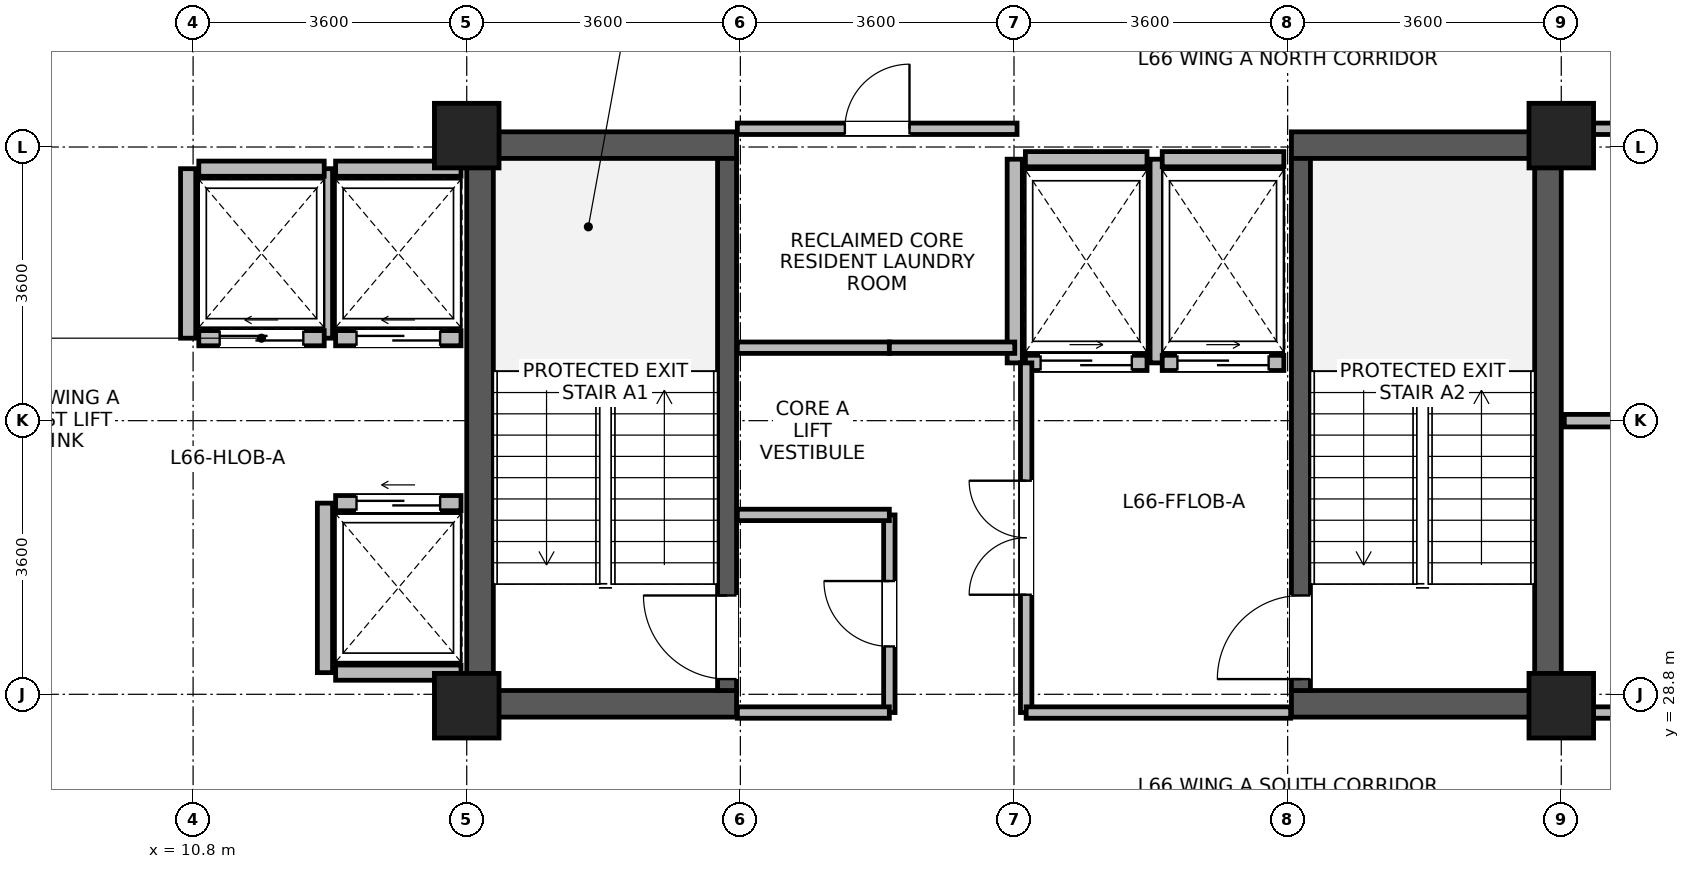
"""IFC4 building model, lengths in metres.
Left out: names, types, materials, properties, quantities, classifications, styles, units other than length and angle.
Written with IfcOpenShell. Run it as: python <this file> out.ifc"""

import sys

from ifc_helpers import new_model, si_unit, direction, frame, frame_2d, origin, origin_2d, place, context, subcontext, project, spatial, rectangle, extrude, source, transform, mapped, element, fill, save


model = new_model("IFC4")
c1 = context("Model", 3, precision=1e-05, world=origin(), true_north=direction((0.0, 1.0)))
c2 = subcontext(c1, "Body", "Model", "MODEL_VIEW")
j1 = project(units=[si_unit("LENGTHUNIT", "METRE"), si_unit("PLANEANGLEUNIT", "RADIAN")], contexts=[c1])
p1 = place(None, origin())
s1 = spatial("IfcSite", under=j1, at=p1, CompositionType="ELEMENT")
p2 = place(p1, origin())
s2 = spatial("IfcBuilding", under=s1, at=p2, CompositionType="ELEMENT")
p3 = place(p2, frame((0.0, 0.0, 257.3)))
s3 = spatial("IfcBuildingStorey", under=s2, at=p3, CompositionType="ELEMENT", Elevation=257.3)
for number, where, z_axis, x_axis in (
    (1, (14.575, 28.5, 0.0), (0.0, 0.0, 1.0), (0.0, 1.0, 0.0)),
    (2, (28.625, 28.5, 0.0), (0.0, 0.0, 1.0), (0.0, 1.0, 0.0)),
):
    element("IfcWall", number, at=place(p3, frame(where, z_axis=z_axis, x_axis=x_axis)), inside=s3, PredefinedType="SHEAR", context=c2, shape_type="SweptSolid", body=[
        extrude(rectangle(XDim=7.7, YDim=0.35, at=frame_2d((3.85, 0.0))), origin(), (0.0, 0.0, 1.0), 3.475),
    ])
for number, where, z_axis, x_axis in (
    (3, (14.75, 28.675, 0.0), (0.0, 0.0, 1.0), (1.0, 0.0, 0.0)),
    (4, (25.25, 28.675, 0.0), (0.0, 0.0, 1.0), (1.0, 0.0, 0.0)),
    (5, (14.75, 36.025, 0.0), (0.0, 0.0, 1.0), (1.0, 0.0, 0.0)),
    (6, (25.25, 36.025, 0.0), (0.0, 0.0, 1.0), (1.0, 0.0, 0.0)),
):
    element("IfcWall", number, at=place(p3, frame(where, z_axis=z_axis, x_axis=x_axis)), inside=s3, PredefinedType="SHEAR", context=c2, shape_type="SweptSolid", body=[
        extrude(rectangle(XDim=3.2, YDim=0.35, at=frame_2d((1.6, 0.0))), origin(), (0.0, 0.0, 1.0), 3.475),
    ])
p4 = place(p3, frame((17.825, 28.85, 0.0), z_axis=(0.0, 0.0, 1.0), x_axis=(0.0, 1.0, 0.0)))
e7 = element("IfcWall", 7, at=p4, inside=s3, PredefinedType="SHEAR", context=c2, shape_type="SweptSolid", body=[
    extrude(rectangle(XDim=7.0, YDim=0.25, at=frame_2d((3.5, 0.0))), origin(), (0.0, 0.0, 1.0), 3.475),
])
p5 = place(p4, frame((0.15, 0.0, 0.0)))
e8 = element("IfcOpeningElement", 8, at=p5, cuts=e7, PredefinedType="OPENING", context=c2, shape_type="SweptSolid", body=[
    extrude(rectangle(XDim=1.1, YDim=2.08, at=frame_2d((0.55, 1.04))), frame((0.0, 0.135, 0.0), z_axis=(0.0, -1.0, 0.0), x_axis=(1.0, 0.0, 0.0)), (0.0, 0.0, 1.0), 0.27),
])
p6 = place(p3, frame((25.375, 28.85, 0.0), z_axis=(0.0, 0.0, 1.0), x_axis=(0.0, 1.0, 0.0)))
e9 = element("IfcWall", 9, at=p6, inside=s3, PredefinedType="SHEAR", context=c2, shape_type="SweptSolid", body=[
    extrude(rectangle(XDim=7.0, YDim=0.25, at=frame_2d((3.5, 0.0))), origin(), (0.0, 0.0, 1.0), 3.475),
])
p7 = place(p6, frame((0.15, 0.0, 0.0)))
e10 = element("IfcOpeningElement", 10, at=p7, cuts=e9, PredefinedType="OPENING", context=c2, shape_type="SweptSolid", body=[
    extrude(rectangle(XDim=1.1, YDim=2.08, at=frame_2d((0.55, 1.04))), frame((0.0, 0.135, 0.0), z_axis=(0.0, -1.0, 0.0), x_axis=(1.0, 0.0, 0.0)), (0.0, 0.0, 1.0), 0.27),
])
m1 = source(origin(), c2, "Body", "SweptSolid", [
    extrude(rectangle(XDim=0.85, YDim=0.85, at=origin_2d()), origin(), (0.0, 0.0, 1.0), 3.7),
])
for number, where, z_axis, x_axis in (
    (11, (14.4, 28.65, 0.0), (0.0, 0.0, 1.0), (1.0, 0.0, 0.0)),
    (12, (14.4, 36.15, 0.0), (0.0, 0.0, 1.0), (1.0, 0.0, 0.0)),
    (13, (28.8, 28.65, 0.0), (0.0, 0.0, 1.0), (1.0, 0.0, 0.0)),
    (14, (28.8, 36.15, 0.0), (0.0, 0.0, 1.0), (1.0, 0.0, 0.0)),
):
    element("IfcColumn", number, at=place(p3, frame(where, z_axis=z_axis, x_axis=x_axis)), inside=s3, PredefinedType="COLUMN", context=c2, shape_type="MappedRepresentation", body=[
        mapped(m1, transform((0.0, 0.0, 0.0), x_axis=(1.0, 0.0, 0.0), y_axis=(0.0, 1.0, 0.0), z_axis=(0.0, 0.0, 1.0), scale=1.0)),
    ])
p8 = place(p3, frame((12.675, 33.485, 0.0), z_axis=(0.0, 0.0, 1.0), x_axis=(1.0, 0.0, 0.0)))
e15 = element("IfcWall", 15, at=p8, inside=s3, PredefinedType="PARTITIONING", context=c2, shape_type="SweptSolid", body=[
    extrude(rectangle(XDim=1.65, YDim=0.2, at=frame_2d((0.825, 0.0))), origin(), (0.0, 0.0, 1.0), 3.455),
])
p9 = place(p8, frame((0.275, 0.0, 0.0)))
e16 = element("IfcOpeningElement", 16, at=p9, cuts=e15, PredefinedType="OPENING", context=c2, shape_type="SweptSolid", body=[
    extrude(rectangle(XDim=1.1, YDim=2.12, at=frame_2d((0.55, 1.06))), frame((0.0, 0.11, 0.0), z_axis=(0.0, -1.0, 0.0), x_axis=(1.0, 0.0, 0.0)), (0.0, 0.0, 1.0), 0.22),
])
p10 = place(p3, frame((12.675, 35.715, 0.0), z_axis=(0.0, 0.0, 1.0), x_axis=(1.0, 0.0, 0.0)))
e17 = element("IfcWall", 17, at=p10, inside=s3, PredefinedType="PARTITIONING", context=c2, shape_type="SweptSolid", body=[
    extrude(rectangle(XDim=1.65, YDim=0.2, at=frame_2d((0.825, 0.0))), origin(), (0.0, 0.0, 1.0), 3.455),
])
p11 = place(p3, frame((12.535, 33.485, 0.0), z_axis=(0.0, 0.0, 1.0), x_axis=(0.0, 1.0, 0.0)))
e18 = element("IfcWall", 18, at=p11, inside=s3, PredefinedType="PARTITIONING", context=c2, shape_type="SweptSolid", body=[
    extrude(rectangle(XDim=2.23, YDim=0.2, at=frame_2d((1.115, 0.0))), origin(), (0.0, 0.0, 1.0), 3.455),
])
p12 = place(p3, frame((12.675, 29.085, 0.0), z_axis=(0.0, 0.0, 1.0), x_axis=(1.0, 0.0, 0.0)))
e19 = element("IfcWall", 19, at=p12, inside=s3, PredefinedType="PARTITIONING", context=c2, shape_type="SweptSolid", body=[
    extrude(rectangle(XDim=1.65, YDim=0.2, at=frame_2d((0.825, 0.0))), origin(), (0.0, 0.0, 1.0), 3.455),
])
p13 = place(p3, frame((12.675, 31.315, 0.0), z_axis=(0.0, 0.0, 1.0), x_axis=(1.0, 0.0, 0.0)))
e20 = element("IfcWall", 20, at=p13, inside=s3, PredefinedType="PARTITIONING", context=c2, shape_type="SweptSolid", body=[
    extrude(rectangle(XDim=1.65, YDim=0.2, at=frame_2d((0.825, 0.0))), origin(), (0.0, 0.0, 1.0), 3.455),
])
p14 = place(p13, frame((0.275, 0.0, 0.0)))
e21 = element("IfcOpeningElement", 21, at=p14, cuts=e20, PredefinedType="OPENING", context=c2, shape_type="SweptSolid", body=[
    extrude(rectangle(XDim=1.1, YDim=2.12, at=frame_2d((0.55, 1.06))), frame((0.0, 0.11, 0.0), z_axis=(0.0, -1.0, 0.0), x_axis=(1.0, 0.0, 0.0)), (0.0, 0.0, 1.0), 0.22),
])
p15 = place(p3, frame((12.535, 29.085, 0.0), z_axis=(0.0, 0.0, 1.0), x_axis=(0.0, 1.0, 0.0)))
e22 = element("IfcWall", 22, at=p15, inside=s3, PredefinedType="PARTITIONING", context=c2, shape_type="SweptSolid", body=[
    extrude(rectangle(XDim=2.23, YDim=0.2, at=frame_2d((1.115, 0.0))), origin(), (0.0, 0.0, 1.0), 3.455),
])
p16 = place(p3, frame((10.875, 33.485, 0.0), z_axis=(0.0, 0.0, 1.0), x_axis=(1.0, 0.0, 0.0)))
e23 = element("IfcWall", 23, at=p16, inside=s3, PredefinedType="PARTITIONING", context=c2, shape_type="SweptSolid", body=[
    extrude(rectangle(XDim=1.65, YDim=0.2, at=frame_2d((0.825, 0.0))), origin(), (0.0, 0.0, 1.0), 3.455),
])
p17 = place(p16, frame((0.275, 0.0, 0.0)))
e24 = element("IfcOpeningElement", 24, at=p17, cuts=e23, PredefinedType="OPENING", context=c2, shape_type="SweptSolid", body=[
    extrude(rectangle(XDim=1.1, YDim=2.12, at=frame_2d((0.55, 1.06))), frame((0.0, 0.11, 0.0), z_axis=(0.0, -1.0, 0.0), x_axis=(1.0, 0.0, 0.0)), (0.0, 0.0, 1.0), 0.22),
])
p18 = place(p3, frame((10.875, 35.715, 0.0), z_axis=(0.0, 0.0, 1.0), x_axis=(1.0, 0.0, 0.0)))
e25 = element("IfcWall", 25, at=p18, inside=s3, PredefinedType="PARTITIONING", context=c2, shape_type="SweptSolid", body=[
    extrude(rectangle(XDim=1.65, YDim=0.2, at=frame_2d((0.825, 0.0))), origin(), (0.0, 0.0, 1.0), 3.455),
])
p19 = place(p3, frame((10.735, 33.485, 0.0), z_axis=(0.0, 0.0, 1.0), x_axis=(0.0, 1.0, 0.0)))
e26 = element("IfcWall", 26, at=p19, inside=s3, PredefinedType="PARTITIONING", context=c2, shape_type="SweptSolid", body=[
    extrude(rectangle(XDim=2.23, YDim=0.2, at=frame_2d((1.115, 0.0))), origin(), (0.0, 0.0, 1.0), 3.455),
])
p20 = place(p3, frame((21.75, 33.16, 0.0), z_axis=(0.0, 0.0, 1.0), x_axis=(1.0, 0.0, 0.0)))
e27 = element("IfcWall", 27, at=p20, inside=s3, PredefinedType="PARTITIONING", context=c2, shape_type="SweptSolid", body=[
    extrude(rectangle(XDim=1.6, YDim=0.2, at=frame_2d((0.8, 0.0))), origin(), (0.0, 0.0, 1.0), 3.455),
])
p21 = place(p20, frame((0.2, 0.0, 0.0)))
e28 = element("IfcOpeningElement", 28, at=p21, cuts=e27, PredefinedType="OPENING", context=c2, shape_type="SweptSolid", body=[
    extrude(rectangle(XDim=1.2, YDim=2.12, at=frame_2d((0.6, 1.06))), frame((0.0, 0.11, 0.0), z_axis=(0.0, -1.0, 0.0), x_axis=(1.0, 0.0, 0.0)), (0.0, 0.0, 1.0), 0.22),
])
p22 = place(p3, frame((21.75, 35.84, 0.0), z_axis=(0.0, 0.0, 1.0), x_axis=(1.0, 0.0, 0.0)))
e29 = element("IfcWall", 29, at=p22, inside=s3, PredefinedType="PARTITIONING", context=c2, shape_type="SweptSolid", body=[
    extrude(rectangle(XDim=1.6, YDim=0.2, at=frame_2d((0.8, 0.0))), origin(), (0.0, 0.0, 1.0), 2.555),
])
for number, where, z_axis, x_axis in (
    (30, (21.61, 33.16, 0.0), (0.0, 0.0, 1.0), (0.0, 1.0, 0.0)),
    (31, (23.49, 33.16, 0.0), (0.0, 0.0, 1.0), (0.0, 1.0, 0.0)),
):
    element("IfcWall", number, at=place(p3, frame(where, z_axis=z_axis, x_axis=x_axis)), inside=s3, PredefinedType="PARTITIONING", context=c2, shape_type="SweptSolid", body=[
        extrude(rectangle(XDim=2.68, YDim=0.2, at=frame_2d((1.34, 0.0))), origin(), (0.0, 0.0, 1.0), 3.455),
    ])
p23 = place(p3, frame((23.55, 33.16, 0.0), z_axis=(0.0, 0.0, 1.0), x_axis=(1.0, 0.0, 0.0)))
e32 = element("IfcWall", 32, at=p23, inside=s3, PredefinedType="PARTITIONING", context=c2, shape_type="SweptSolid", body=[
    extrude(rectangle(XDim=1.6, YDim=0.2, at=frame_2d((0.8, 0.0))), origin(), (0.0, 0.0, 1.0), 3.455),
])
p24 = place(p23, frame((0.2, 0.0, 0.0)))
e33 = element("IfcOpeningElement", 33, at=p24, cuts=e32, PredefinedType="OPENING", context=c2, shape_type="SweptSolid", body=[
    extrude(rectangle(XDim=1.2, YDim=2.12, at=frame_2d((0.6, 1.06))), frame((0.0, 0.11, 0.0), z_axis=(0.0, -1.0, 0.0), x_axis=(1.0, 0.0, 0.0)), (0.0, 0.0, 1.0), 0.22),
])
p25 = place(p3, frame((23.55, 35.84, 0.0), z_axis=(0.0, 0.0, 1.0), x_axis=(1.0, 0.0, 0.0)))
e34 = element("IfcWall", 34, at=p25, inside=s3, PredefinedType="PARTITIONING", context=c2, shape_type="SweptSolid", body=[
    extrude(rectangle(XDim=1.6, YDim=0.2, at=frame_2d((0.8, 0.0))), origin(), (0.0, 0.0, 1.0), 2.555),
])
p26 = place(p3, frame((29.225, 28.56, 0.0), z_axis=(0.0, 0.0, 1.0), x_axis=(1.0, 0.0, 0.0)))
e35 = element("IfcWall", 35, at=p26, inside=s3, PredefinedType="PARTITIONING", context=c2, shape_type="SweptSolid", body=[
    extrude(rectangle(XDim=4.135, YDim=0.15, at=frame_2d((2.067, 0.0))), origin(), (0.0, 0.0, 1.0), 2.905),
])
p27 = place(p26, frame((1.637, 0.0, 0.0)))
e36 = element("IfcOpeningElement", 36, at=p27, cuts=e35, PredefinedType="OPENING", context=c2, shape_type="SweptSolid", body=[
    extrude(rectangle(XDim=0.86, YDim=2.02, at=frame_2d((0.43, 1.01))), frame((0.0, 0.085, 0.0), z_axis=(0.0, -1.0, 0.0), x_axis=(1.0, 0.0, 0.0)), (0.0, 0.0, 1.0), 0.17),
])
p28 = place(p3, frame((29.225, 36.24, 0.0), z_axis=(0.0, 0.0, 1.0), x_axis=(1.0, 0.0, 0.0)))
e37 = element("IfcWall", 37, at=p28, inside=s3, PredefinedType="PARTITIONING", context=c2, shape_type="SweptSolid", body=[
    extrude(rectangle(XDim=4.135, YDim=0.15, at=frame_2d((2.067, 0.0))), origin(), (0.0, 0.0, 1.0), 2.905),
])
p29 = place(p28, frame((1.417, 0.0, 0.0)))
e38 = element("IfcOpeningElement", 38, at=p29, cuts=e37, PredefinedType="OPENING", context=c2, shape_type="SweptSolid", body=[
    extrude(rectangle(XDim=1.3, YDim=2.12, at=frame_2d((0.65, 1.06))), frame((0.0, 0.085, 0.0), z_axis=(0.0, -1.0, 0.0), x_axis=(1.0, 0.0, 0.0)), (0.0, 0.0, 1.0), 0.17),
])
p30 = place(p3, frame((17.96, 36.24, 0.0), z_axis=(0.0, 0.0, 1.0), x_axis=(1.0, 0.0, 0.0)))
e39 = element("IfcWall", 39, at=p30, inside=s3, PredefinedType="PARTITIONING", context=c2, shape_type="SweptSolid", body=[
    extrude(rectangle(XDim=3.68, YDim=0.15, at=frame_2d((1.84, 0.0))), origin(), (0.0, 0.0, 1.0), 2.555),
])
p31 = place(p30, frame((1.415, 0.0, 0.0)))
e40 = element("IfcOpeningElement", 40, at=p31, cuts=e39, PredefinedType="OPENING", context=c2, shape_type="SweptSolid", body=[
    extrude(rectangle(XDim=0.85, YDim=2.04, at=frame_2d((0.425, 1.02))), frame((0.0, 0.085, 0.0), z_axis=(0.0, -1.0, 0.0), x_axis=(1.0, 0.0, 0.0)), (0.0, 0.0, 1.0), 0.17),
])
p32 = place(p3, frame((19.96, 28.56, 0.0), z_axis=(0.0, 0.0, 1.0), x_axis=(0.0, 1.0, 0.0)))
e41 = element("IfcWall", 41, at=p32, inside=s3, PredefinedType="PARTITIONING", context=c2, shape_type="SweptSolid", body=[
    extrude(rectangle(XDim=2.6, YDim=0.15, at=frame_2d((1.3, 0.0))), origin(), (0.0, 0.0, 1.0), 3.455),
])
p33 = place(p32, frame((0.87, 0.0, 0.0)))
e42 = element("IfcOpeningElement", 42, at=p33, cuts=e41, PredefinedType="OPENING", context=c2, shape_type="SweptSolid", body=[
    extrude(rectangle(XDim=0.86, YDim=2.02, at=frame_2d((0.43, 1.01))), frame((0.0, 0.085, 0.0), z_axis=(0.0, -1.0, 0.0), x_axis=(1.0, 0.0, 0.0)), (0.0, 0.0, 1.0), 0.17),
])
p34 = place(p3, frame((17.96, 28.56, 0.0), z_axis=(0.0, 0.0, 1.0), x_axis=(1.0, 0.0, 0.0)))
e43 = element("IfcWall", 43, at=p34, inside=s3, PredefinedType="PARTITIONING", context=c2, shape_type="SweptSolid", body=[
    extrude(rectangle(XDim=2.0, YDim=0.15, at=frame_2d((1.0, 0.0))), origin(), (0.0, 0.0, 1.0), 2.555),
])
for number, where, z_axis, x_axis in (
    (44, (17.96, 31.16, 0.0), (0.0, 0.0, 1.0), (1.0, 0.0, 0.0)),
    (45, (17.96, 33.36, 0.0), (0.0, 0.0, 1.0), (1.0, 0.0, 0.0)),
):
    element("IfcWall", number, at=place(p3, frame(where, z_axis=z_axis, x_axis=x_axis)), inside=s3, PredefinedType="PARTITIONING", context=c2, shape_type="SweptSolid", body=[
        extrude(rectangle(XDim=2.0, YDim=0.15, at=frame_2d((1.0, 0.0))), origin(), (0.0, 0.0, 1.0), 3.455),
    ])
p35 = place(p3, frame((19.96, 33.36, 0.0), z_axis=(0.0, 0.0, 1.0), x_axis=(1.0, 0.0, 0.0)))
e46 = element("IfcWall", 46, at=p35, inside=s3, PredefinedType="PARTITIONING", context=c2, shape_type="SweptSolid", body=[
    extrude(rectangle(XDim=1.65, YDim=0.15, at=frame_2d((0.825, 0.0))), origin(), (0.0, 0.0, 1.0), 3.455),
])
p36 = place(p3, frame((21.76, 28.56, 0.0), z_axis=(0.0, 0.0, 1.0), x_axis=(0.0, 1.0, 0.0)))
e47 = element("IfcWall", 47, at=p36, inside=s3, PredefinedType="PARTITIONING", context=c2, shape_type="SweptSolid", body=[
    extrude(rectangle(XDim=4.6, YDim=0.15, at=frame_2d((2.3, 0.0))), origin(), (0.0, 0.0, 1.0), 3.455),
])
p37 = place(p36, frame((1.55, 0.0, 0.0)))
e48 = element("IfcOpeningElement", 48, at=p37, cuts=e47, PredefinedType="OPENING", context=c2, shape_type="SweptSolid", body=[
    extrude(rectangle(XDim=1.5, YDim=2.1, at=frame_2d((0.75, 1.05))), frame((0.0, 0.085, 0.0), z_axis=(0.0, -1.0, 0.0), x_axis=(1.0, 0.0, 0.0)), (0.0, 0.0, 1.0), 0.17),
])
p38 = place(p3, frame((28.84, 32.4, 0.0), z_axis=(0.0, 0.0, 1.0), x_axis=(1.0, 0.0, 0.0)))
e49 = element("IfcWall", 49, at=p38, inside=s3, PredefinedType="PARTITIONING", context=c2, shape_type="SweptSolid", body=[
    extrude(rectangle(XDim=4.52, YDim=0.165, at=frame_2d((2.26, 0.0))), origin(), (0.0, 0.0, 1.0), 3.455),
])
p39 = place(p3, frame((21.76, 28.56, 0.0), z_axis=(0.0, 0.0, 1.0), x_axis=(1.0, 0.0, 0.0)))
e50 = element("IfcWall", 50, at=p39, inside=s3, PredefinedType="PARTITIONING", context=c2, shape_type="SweptSolid", body=[
    extrude(rectangle(XDim=3.48, YDim=0.15, at=frame_2d((1.74, 0.0))), origin(), (0.0, 0.0, 1.0), 2.555),
])
p40 = place(p5, origin())
e51 = element("IfcDoor", 51, at=p40, inside=s3, OperationType="SINGLE_SWING_RIGHT", PredefinedType="DOOR", context=c2, shape_type="SweptSolid", body=[
    extrude(rectangle(XDim=1.1, YDim=2.08, at=frame_2d((0.55, 1.04))), frame((0.0, 0.025, 0.0), z_axis=(0.0, -1.0, 0.0), x_axis=(1.0, 0.0, 0.0)), (0.0, 0.0, 1.0), 0.05),
])
fill(e8, e51)
p41 = place(p7, origin())
e52 = element("IfcDoor", 52, at=p41, inside=s3, OperationType="SINGLE_SWING_LEFT", PredefinedType="DOOR", context=c2, shape_type="SweptSolid", body=[
    extrude(rectangle(XDim=1.1, YDim=2.08, at=frame_2d((0.55, 1.04))), frame((0.0, 0.025, 0.0), z_axis=(0.0, -1.0, 0.0), x_axis=(1.0, 0.0, 0.0)), (0.0, 0.0, 1.0), 0.05),
])
fill(e10, e52)
p42 = place(p9, origin())
e53 = element("IfcDoor", 53, at=p42, inside=s3, OperationType="SLIDING_TO_LEFT", PredefinedType="DOOR", context=c2, shape_type="SweptSolid", body=[
    extrude(rectangle(XDim=1.1, YDim=2.12, at=frame_2d((0.55, 1.06))), frame((0.0, 0.025, 0.0), z_axis=(0.0, -1.0, 0.0), x_axis=(1.0, 0.0, 0.0)), (0.0, 0.0, 1.0), 0.05),
])
fill(e16, e53)
p43 = place(p14, origin())
e54 = element("IfcDoor", 54, at=p43, inside=s3, OperationType="SLIDING_TO_LEFT", PredefinedType="DOOR", context=c2, shape_type="SweptSolid", body=[
    extrude(rectangle(XDim=1.1, YDim=2.12, at=frame_2d((0.55, 1.06))), frame((0.0, 0.025, 0.0), z_axis=(0.0, -1.0, 0.0), x_axis=(1.0, 0.0, 0.0)), (0.0, 0.0, 1.0), 0.05),
])
fill(e21, e54)
p44 = place(p17, origin())
e55 = element("IfcDoor", 55, at=p44, inside=s3, OperationType="SLIDING_TO_LEFT", PredefinedType="DOOR", context=c2, shape_type="SweptSolid", body=[
    extrude(rectangle(XDim=1.1, YDim=2.12, at=frame_2d((0.55, 1.06))), frame((0.0, 0.025, 0.0), z_axis=(0.0, -1.0, 0.0), x_axis=(1.0, 0.0, 0.0)), (0.0, 0.0, 1.0), 0.05),
])
fill(e24, e55)
p45 = place(p21, origin())
e56 = element("IfcDoor", 56, at=p45, inside=s3, OperationType="SLIDING_TO_RIGHT", PredefinedType="DOOR", context=c2, shape_type="SweptSolid", body=[
    extrude(rectangle(XDim=1.2, YDim=2.12, at=frame_2d((0.6, 1.06))), frame((0.0, 0.025, 0.0), z_axis=(0.0, -1.0, 0.0), x_axis=(1.0, 0.0, 0.0)), (0.0, 0.0, 1.0), 0.05),
])
fill(e28, e56)
p46 = place(p24, origin())
e57 = element("IfcDoor", 57, at=p46, inside=s3, OperationType="SLIDING_TO_RIGHT", PredefinedType="DOOR", context=c2, shape_type="SweptSolid", body=[
    extrude(rectangle(XDim=1.2, YDim=2.12, at=frame_2d((0.6, 1.06))), frame((0.0, 0.025, 0.0), z_axis=(0.0, -1.0, 0.0), x_axis=(1.0, 0.0, 0.0)), (0.0, 0.0, 1.0), 0.05),
])
fill(e33, e57)
p47 = place(p31, origin())
e58 = element("IfcDoor", 58, at=p47, inside=s3, OperationType="SINGLE_SWING_RIGHT", PredefinedType="DOOR", context=c2, shape_type="SweptSolid", body=[
    extrude(rectangle(XDim=0.85, YDim=2.04, at=frame_2d((0.425, 1.02))), frame((0.0, 0.025, 0.0), z_axis=(0.0, -1.0, 0.0), x_axis=(1.0, 0.0, 0.0)), (0.0, 0.0, 1.0), 0.05),
])
fill(e40, e58)
p48 = place(p33, origin())
e59 = element("IfcDoor", 59, at=p48, inside=s3, OperationType="SINGLE_SWING_RIGHT", PredefinedType="DOOR", context=c2, shape_type="SweptSolid", body=[
    extrude(rectangle(XDim=0.86, YDim=2.02, at=frame_2d((0.43, 1.01))), frame((0.0, 0.025, 0.0), z_axis=(0.0, -1.0, 0.0), x_axis=(1.0, 0.0, 0.0)), (0.0, 0.0, 1.0), 0.05),
])
fill(e42, e59)
p49 = place(p37, origin())
e60 = element("IfcDoor", 60, at=p49, inside=s3, OperationType="DOUBLE_DOOR_SINGLE_SWING", PredefinedType="DOOR", context=c2, shape_type="SweptSolid", body=[
    extrude(rectangle(XDim=1.5, YDim=2.1, at=frame_2d((0.75, 1.05))), frame((0.0, 0.025, 0.0), z_axis=(0.0, -1.0, 0.0), x_axis=(1.0, 0.0, 0.0)), (0.0, 0.0, 1.0), 0.05),
])
fill(e48, e60)
save(model, sys.argv[1])
